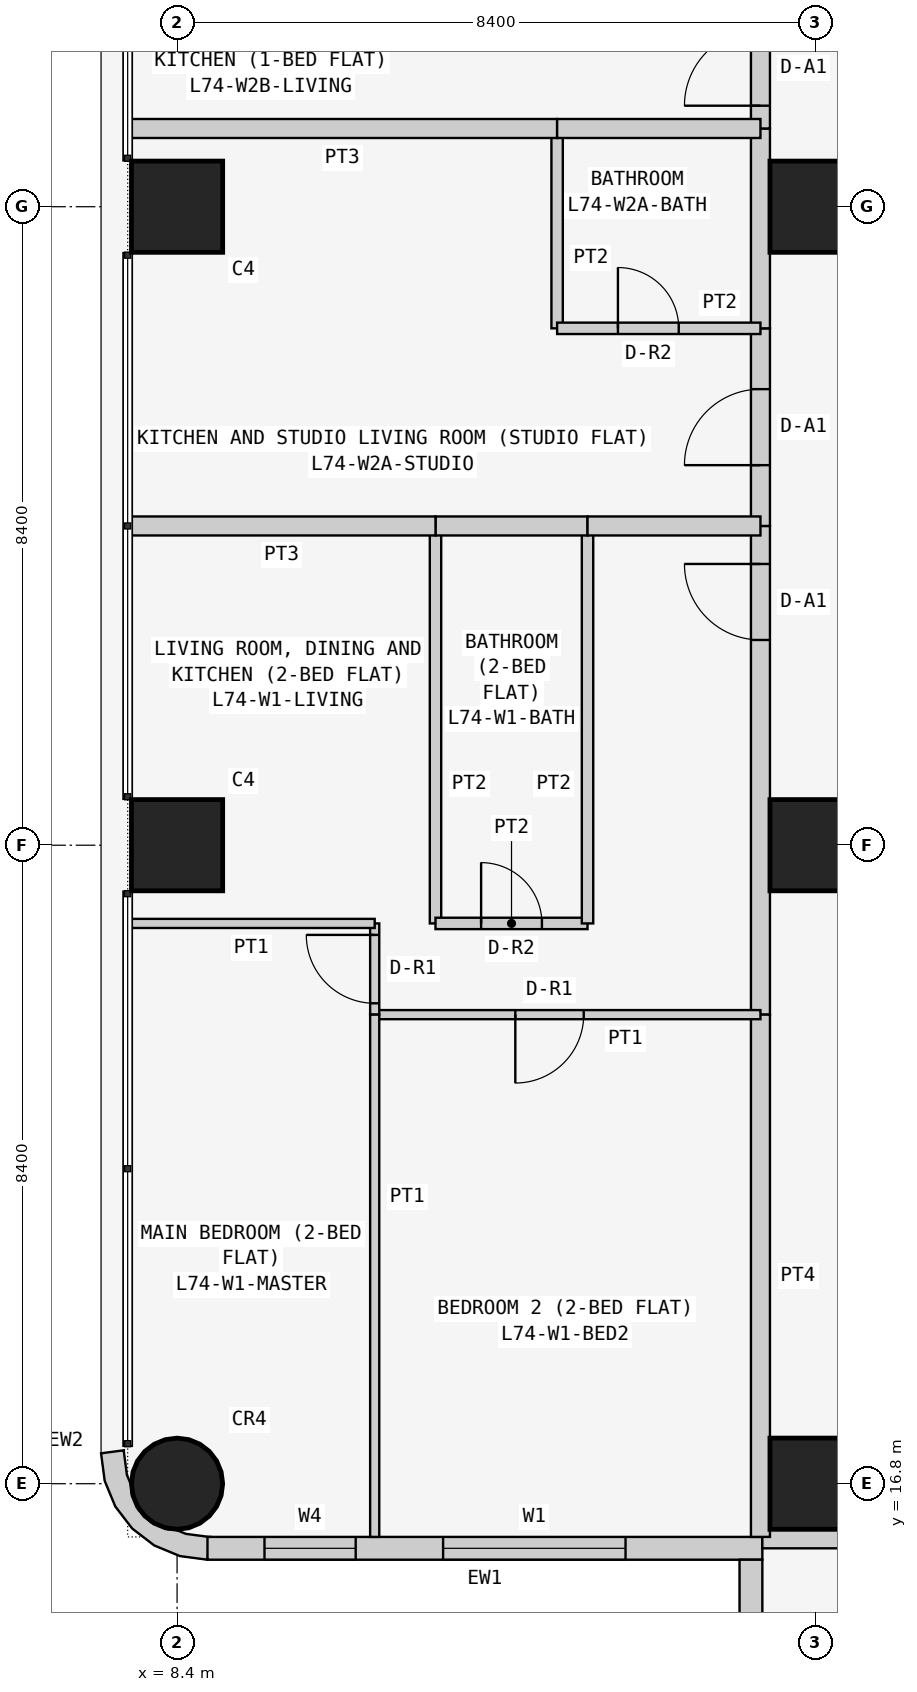
"""IFC4 building model, lengths in metres.
Left out: names, types, materials, properties, quantities, classifications, styles, units other than length and angle.
Written with IfcOpenShell. Run it as: python <this file> out.ifc"""

import sys

from ifc_helpers import new_model, si_unit, direction, frame, frame_2d, origin, origin_2d, place, context, subcontext, project, spatial, polyline, rectangle, circle, outline, extrude, element, fill, save


model = new_model("IFC4")
c1 = context("Model", 3, precision=1e-05, world=origin(), true_north=direction((0.0, 1.0)))
c2 = subcontext(c1, "Body", "Model", "MODEL_VIEW")
j1 = project(units=[si_unit("LENGTHUNIT", "METRE"), si_unit("PLANEANGLEUNIT", "RADIAN")], contexts=[c1])
p1 = place(None, origin())
s1 = spatial("IfcSite", under=j1, at=p1, CompositionType="ELEMENT")
p2 = place(p1, origin())
s2 = spatial("IfcBuilding", under=s1, at=p2, CompositionType="ELEMENT")
p3 = place(p2, frame((0.0, 0.0, 282.9)))
s3 = spatial("IfcBuildingStorey", under=s2, at=p3, CompositionType="ELEMENT", Elevation=282.9)
p4 = place(p3, frame((8.4, 16.8, 0.0), z_axis=(0.0, 0.0, 1.0), x_axis=(1.0, 0.0, 0.0)))
e1 = element("IfcColumn", 1, at=p4, inside=s3, PredefinedType="COLUMN", context=c2, shape_type="SweptSolid", body=[
    extrude(circle(Radius=0.6, at=origin_2d()), origin(), (0.0, 0.0, 1.0), 3.6),
])
for number, where, z_axis, x_axis in (
    (2, (8.4, 25.2, 0.0), (0.0, 0.0, 1.0), (1.0, 0.0, 0.0)),
    (3, (8.4, 33.6, 0.0), (0.0, 0.0, 1.0), (1.0, 0.0, 0.0)),
    (4, (16.8, 16.8, 0.0), (0.0, 0.0, 1.0), (1.0, 0.0, 0.0)),
    (5, (16.8, 25.2, 0.0), (0.0, 0.0, 1.0), (1.0, 0.0, 0.0)),
    (6, (16.8, 33.6, 0.0), (0.0, 0.0, 1.0), (1.0, 0.0, 0.0)),
):
    element("IfcColumn", number, at=place(p3, frame(where, z_axis=z_axis, x_axis=x_axis)), inside=s3, PredefinedType="COLUMN", context=c2, shape_type="SweptSolid", body=[
        extrude(rectangle(XDim=1.2, YDim=1.2, at=origin_2d()), origin(), (0.0, 0.0, 1.0), 3.6),
    ])
p5 = place(p3, frame((8.8, 15.95, 0.0), z_axis=(0.0, 0.0, 1.0), x_axis=(1.0, 0.0, 0.0)))
e7 = element("IfcWall", 7, at=p5, inside=s3, PredefinedType="SOLIDWALL", context=c2, shape_type="SweptSolid", body=[
    extrude(rectangle(XDim=7.3, YDim=0.3, at=frame_2d((3.65, 0.0))), origin(), (0.0, 0.0, 1.0), 3.45),
])
p6 = place(p5, frame((3.1, 0.0, 0.9)))
e8 = element("IfcOpeningElement", 8, at=p6, cuts=e7, PredefinedType="OPENING", context=c2, shape_type="SweptSolid", body=[
    extrude(rectangle(XDim=2.4, YDim=1.5, at=frame_2d((1.2, 0.75))), frame((0.0, 0.16, 0.0), z_axis=(0.0, -1.0, 0.0), x_axis=(1.0, 0.0, 0.0)), (0.0, 0.0, 1.0), 0.32),
])
p7 = place(p5, frame((0.75, 0.0, 0.9)))
e9 = element("IfcOpeningElement", 9, at=p7, cuts=e7, PredefinedType="OPENING", context=c2, shape_type="SweptSolid", body=[
    extrude(rectangle(XDim=1.2, YDim=1.5, at=frame_2d((0.6, 0.75))), frame((0.0, 0.16, 0.0), z_axis=(0.0, -1.0, 0.0), x_axis=(1.0, 0.0, 0.0)), (0.0, 0.0, 1.0), 0.32),
])
p8 = place(p3, frame((15.95, 15.8, 0.0), z_axis=(0.0, 0.0, 1.0), x_axis=(0.0, -1.0, 0.0)))
e10 = element("IfcWall", 10, at=p8, inside=s3, PredefinedType="SOLIDWALL", context=c2, shape_type="SweptSolid", body=[
    extrude(rectangle(XDim=7.0, YDim=0.3, at=frame_2d((3.5, 0.0))), origin(), (0.0, 0.0, 1.0), 3.45),
])
p9 = place(p8, frame((1.5, 0.0, 0.9)))
e11 = element("IfcOpeningElement", 11, at=p9, cuts=e10, PredefinedType="OPENING", context=c2, shape_type="SweptSolid", body=[
    extrude(rectangle(XDim=2.4, YDim=1.5, at=frame_2d((1.2, 0.75))), frame((0.0, 0.16, 0.0), z_axis=(0.0, -1.0, 0.0), x_axis=(1.0, 0.0, 0.0)), (0.0, 0.0, 1.0), 0.32),
])
p10 = place(p8, frame((5.05, 0.0, 0.9)))
e12 = element("IfcOpeningElement", 12, at=p10, cuts=e10, PredefinedType="OPENING", context=c2, shape_type="SweptSolid", body=[
    extrude(rectangle(XDim=1.2, YDim=1.5, at=frame_2d((0.6, 0.75))), frame((0.0, 0.16, 0.0), z_axis=(0.0, -1.0, 0.0), x_axis=(1.0, 0.0, 0.0)), (0.0, 0.0, 1.0), 0.32),
])
p11 = place(p3, frame((7.824, 17.162, 0.0), z_axis=(0.0, 0.0, 1.0), x_axis=(-0.707106781187, -0.707106781187, 0.0)))
e13 = element("IfcWall", 13, at=p11, inside=s3, PredefinedType="SOLIDWALL", context=c2, shape_type="SweptSolid", body=[
    extrude(outline(polyline([(0.047, 1.454), (0.233, 1.212), (0.292, 1.069), (0.358, 1.003), (0.449, 0.782), (0.449, 0.543), (0.358, 0.323), (0.292, 0.257), (0.233, 0.114), (0.047, -0.129), (0.033, -0.143), (0.273, -0.327), (0.495, -0.037), (0.635, 0.301), (0.683, 0.663), (0.635, 1.025), (0.495, 1.363), (0.273, 1.653), (0.033, 1.469), (0.047, 1.454)])), origin(), (0.0, 0.0, 1.0), 3.45),
])
p12 = place(p3, frame((22.571, 16.075, 0.0), z_axis=(0.0, 0.0, 1.0), x_axis=(-1.0, 0.0, 0.0)))
e14 = element("IfcWall", 14, at=p12, inside=s3, PredefinedType="PARTITIONING", context=c2, shape_type="SweptSolid", body=[
    extrude(rectangle(XDim=6.471, YDim=0.25, at=frame_2d((3.235, 0.0))), origin(), (0.0, 0.0, 1.0), 3.45),
])
p13 = place(p3, frame((16.075, 22.971, 0.0), z_axis=(0.0, 0.0, 1.0), x_axis=(0.0, 1.0, 0.0)))
e15 = element("IfcWall", 15, at=p13, inside=s3, PredefinedType="PARTITIONING", context=c2, shape_type="SweptSolid", body=[
    extrude(rectangle(XDim=6.429, YDim=0.25, at=frame_2d((3.214, 0.0))), origin(), (0.0, 0.0, 1.0), 3.45),
])
p14 = place(p13, frame((4.929, 0.0, 0.0)))
e16 = element("IfcOpeningElement", 16, at=p14, cuts=e15, PredefinedType="OPENING", context=c2, shape_type="SweptSolid", body=[
    extrude(rectangle(XDim=1.0, YDim=2.1, at=frame_2d((0.5, 1.05))), frame((0.0, 0.135, 0.0), z_axis=(0.0, -1.0, 0.0), x_axis=(1.0, 0.0, 0.0)), (0.0, 0.0, 1.0), 0.27),
])
p15 = place(p3, frame((16.075, 16.1, 0.0), z_axis=(0.0, 0.0, 1.0), x_axis=(0.0, 1.0, 0.0)))
e17 = element("IfcWall", 17, at=p15, inside=s3, PredefinedType="PARTITIONING", context=c2, shape_type="SweptSolid", body=[
    extrude(rectangle(XDim=6.871, YDim=0.25, at=frame_2d((3.436, 0.0))), origin(), (0.0, 0.0, 1.0), 3.45),
])
p16 = place(p3, frame((16.075, 29.4, 0.0), z_axis=(0.0, 0.0, 1.0), x_axis=(0.0, 1.0, 0.0)))
e18 = element("IfcWall", 18, at=p16, inside=s3, PredefinedType="PARTITIONING", context=c2, shape_type="SweptSolid", body=[
    extrude(rectangle(XDim=2.6, YDim=0.25, at=frame_2d((1.3, 0.0))), origin(), (0.0, 0.0, 1.0), 3.45),
])
p17 = place(p16, frame((0.8, 0.0, 0.0)))
e19 = element("IfcOpeningElement", 19, at=p17, cuts=e18, PredefinedType="OPENING", context=c2, shape_type="SweptSolid", body=[
    extrude(rectangle(XDim=1.0, YDim=2.1, at=frame_2d((0.5, 1.05))), frame((0.0, 0.135, 0.0), z_axis=(0.0, -1.0, 0.0), x_axis=(1.0, 0.0, 0.0)), (0.0, 0.0, 1.0), 0.27),
])
p18 = place(p3, frame((16.075, 32.0, 0.0), z_axis=(0.0, 0.0, 1.0), x_axis=(0.0, 1.0, 0.0)))
e20 = element("IfcWall", 20, at=p18, inside=s3, PredefinedType="PARTITIONING", context=c2, shape_type="SweptSolid", body=[
    extrude(rectangle(XDim=2.629, YDim=0.25, at=frame_2d((1.314, 0.0))), origin(), (0.0, 0.0, 1.0), 3.45),
])
p19 = place(p3, frame((16.075, 34.629, 0.0), z_axis=(0.0, 0.0, 1.0), x_axis=(0.0, 1.0, 0.0)))
e21 = element("IfcWall", 21, at=p19, inside=s3, PredefinedType="PARTITIONING", context=c2, shape_type="SweptSolid", body=[
    extrude(rectangle(XDim=1.6, YDim=0.25, at=frame_2d((0.8, 0.0))), origin(), (0.0, 0.0, 1.0), 3.45),
])
p20 = place(p19, frame((0.3, 0.0, 0.0)))
e22 = element("IfcOpeningElement", 22, at=p20, cuts=e21, PredefinedType="OPENING", context=c2, shape_type="SweptSolid", body=[
    extrude(rectangle(XDim=1.0, YDim=2.1, at=frame_2d((0.5, 1.05))), frame((0.0, 0.135, 0.0), z_axis=(0.0, -1.0, 0.0), x_axis=(1.0, 0.0, 0.0)), (0.0, 0.0, 1.0), 0.27),
])
p21 = place(p3, frame((11.8, 29.4, 0.0), z_axis=(0.0, 0.0, 1.0), x_axis=(0.0, -1.0, 0.0)))
e23 = element("IfcWall", 23, at=p21, inside=s3, PredefinedType="PARTITIONING", context=c2, shape_type="SweptSolid", body=[
    extrude(rectangle(XDim=5.229, YDim=0.15, at=frame_2d((2.615, 0.0))), origin(), (0.0, 0.0, 1.0), 3.45),
])
p22 = place(p3, frame((11.8, 24.171, 0.0), z_axis=(0.0, 0.0, 1.0), x_axis=(1.0, 0.0, 0.0)))
e24 = element("IfcWall", 24, at=p22, inside=s3, PredefinedType="PARTITIONING", context=c2, shape_type="SweptSolid", body=[
    extrude(rectangle(XDim=2.0, YDim=0.15, at=frame_2d((1.0, 0.0))), origin(), (0.0, 0.0, 1.0), 3.45),
])
p23 = place(p22, frame((0.6, 0.0, 0.0)))
e25 = element("IfcOpeningElement", 25, at=p23, cuts=e24, PredefinedType="OPENING", context=c2, shape_type="SweptSolid", body=[
    extrude(rectangle(XDim=0.8, YDim=2.1, at=frame_2d((0.4, 1.05))), frame((0.0, 0.085, 0.0), z_axis=(0.0, -1.0, 0.0), x_axis=(1.0, 0.0, 0.0)), (0.0, 0.0, 1.0), 0.17),
])
p24 = place(p3, frame((13.8, 24.171, 0.0), z_axis=(0.0, 0.0, 1.0), x_axis=(0.0, 1.0, 0.0)))
e26 = element("IfcWall", 26, at=p24, inside=s3, PredefinedType="PARTITIONING", context=c2, shape_type="SweptSolid", body=[
    extrude(rectangle(XDim=5.229, YDim=0.15, at=frame_2d((2.615, 0.0))), origin(), (0.0, 0.0, 1.0), 3.45),
])
p25 = place(p3, frame((13.8, 29.4, 0.0), z_axis=(0.0, 0.0, 1.0), x_axis=(-1.0, 0.0, 0.0)))
e27 = element("IfcWall", 27, at=p25, inside=s3, PredefinedType="PARTITIONING", context=c2, shape_type="SweptSolid", body=[
    extrude(rectangle(XDim=2.0, YDim=0.25, at=frame_2d((1.0, 0.0))), origin(), (0.0, 0.0, 1.0), 3.45),
])
p26 = place(p3, frame((16.075, 22.971, 0.0), z_axis=(0.0, 0.0, 1.0), x_axis=(-1.0, 0.0, 0.0)))
e28 = element("IfcWall", 28, at=p26, inside=s3, PredefinedType="PARTITIONING", context=c2, shape_type="SweptSolid", body=[
    extrude(rectangle(XDim=5.075, YDim=0.12, at=frame_2d((2.538, 0.0))), origin(), (0.0, 0.0, 1.0), 3.45),
])
p27 = place(p26, frame((2.325, 0.0, 0.0)))
e29 = element("IfcOpeningElement", 29, at=p27, cuts=e28, PredefinedType="OPENING", context=c2, shape_type="SweptSolid", body=[
    extrude(rectangle(XDim=0.9, YDim=2.1, at=frame_2d((0.45, 1.05))), frame((0.0, 0.07, 0.0), z_axis=(0.0, -1.0, 0.0), x_axis=(1.0, 0.0, 0.0)), (0.0, 0.0, 1.0), 0.14),
])
p28 = place(p3, frame((11.0, 22.971, 0.0), z_axis=(0.0, 0.0, 1.0), x_axis=(0.0, 1.0, 0.0)))
e30 = element("IfcWall", 30, at=p28, inside=s3, PredefinedType="PARTITIONING", context=c2, shape_type="SweptSolid", body=[
    extrude(rectangle(XDim=1.2, YDim=0.12, at=frame_2d((0.6, 0.0))), origin(), (0.0, 0.0, 1.0), 3.45),
])
p29 = place(p28, frame((0.149, 0.0, 0.0)))
e31 = element("IfcOpeningElement", 31, at=p29, cuts=e30, PredefinedType="OPENING", context=c2, shape_type="SweptSolid", body=[
    extrude(rectangle(XDim=0.9, YDim=2.1, at=frame_2d((0.45, 1.05))), frame((0.0, 0.07, 0.0), z_axis=(0.0, -1.0, 0.0), x_axis=(1.0, 0.0, 0.0)), (0.0, 0.0, 1.0), 0.14),
])
p30 = place(p3, frame((11.0, 24.171, 0.0), z_axis=(0.0, 0.0, 1.0), x_axis=(-1.0, 0.0, 0.0)))
e32 = element("IfcWall", 32, at=p30, inside=s3, PredefinedType="PARTITIONING", context=c2, shape_type="SweptSolid", body=[
    extrude(rectangle(XDim=3.25, YDim=0.12, at=frame_2d((1.625, 0.0))), origin(), (0.0, 0.0, 1.0), 3.45),
])
p31 = place(p3, frame((7.75, 29.4, 0.0), z_axis=(0.0, 0.0, 1.0), x_axis=(1.0, 0.0, 0.0)))
e33 = element("IfcWall", 33, at=p31, inside=s3, PredefinedType="PARTITIONING", context=c2, shape_type="SweptSolid", body=[
    extrude(rectangle(XDim=4.05, YDim=0.25, at=frame_2d((2.025, 0.0))), origin(), (0.0, 0.0, 1.0), 3.45),
])
p32 = place(p3, frame((13.8, 29.4, 0.0), z_axis=(0.0, 0.0, 1.0), x_axis=(1.0, 0.0, 0.0)))
e34 = element("IfcWall", 34, at=p32, inside=s3, PredefinedType="PARTITIONING", context=c2, shape_type="SweptSolid", body=[
    extrude(rectangle(XDim=2.275, YDim=0.25, at=frame_2d((1.137, 0.0))), origin(), (0.0, 0.0, 1.0), 3.45),
])
p33 = place(p3, frame((11.0, 22.971, 0.0), z_axis=(0.0, 0.0, 1.0), x_axis=(0.0, -1.0, 0.0)))
e35 = element("IfcWall", 35, at=p33, inside=s3, PredefinedType="PARTITIONING", context=c2, shape_type="SweptSolid", body=[
    extrude(rectangle(XDim=6.871, YDim=0.12, at=frame_2d((3.436, 0.0))), origin(), (0.0, 0.0, 1.0), 3.45),
])
p34 = place(p3, frame((13.4, 34.629, 0.0), z_axis=(0.0, 0.0, 1.0), x_axis=(0.0, -1.0, 0.0)))
e36 = element("IfcWall", 36, at=p34, inside=s3, PredefinedType="PARTITIONING", context=c2, shape_type="SweptSolid", body=[
    extrude(rectangle(XDim=2.629, YDim=0.15, at=frame_2d((1.314, 0.0))), origin(), (0.0, 0.0, 1.0), 3.45),
])
p35 = place(p3, frame((13.4, 32.0, 0.0), z_axis=(0.0, 0.0, 1.0), x_axis=(1.0, 0.0, 0.0)))
e37 = element("IfcWall", 37, at=p35, inside=s3, PredefinedType="PARTITIONING", context=c2, shape_type="SweptSolid", body=[
    extrude(rectangle(XDim=2.675, YDim=0.15, at=frame_2d((1.337, 0.0))), origin(), (0.0, 0.0, 1.0), 3.45),
])
p36 = place(p35, frame((0.8, 0.0, 0.0)))
e38 = element("IfcOpeningElement", 38, at=p36, cuts=e37, PredefinedType="OPENING", context=c2, shape_type="SweptSolid", body=[
    extrude(rectangle(XDim=0.8, YDim=2.1, at=frame_2d((0.4, 1.05))), frame((0.0, 0.085, 0.0), z_axis=(0.0, -1.0, 0.0), x_axis=(1.0, 0.0, 0.0)), (0.0, 0.0, 1.0), 0.17),
])
p37 = place(p3, frame((7.75, 34.629, 0.0), z_axis=(0.0, 0.0, 1.0), x_axis=(1.0, 0.0, 0.0)))
e39 = element("IfcWall", 39, at=p37, inside=s3, PredefinedType="PARTITIONING", context=c2, shape_type="SweptSolid", body=[
    extrude(rectangle(XDim=5.65, YDim=0.25, at=frame_2d((2.825, 0.0))), origin(), (0.0, 0.0, 1.0), 3.45),
])
p38 = place(p3, frame((13.4, 34.629, 0.0), z_axis=(0.0, 0.0, 1.0), x_axis=(1.0, 0.0, 0.0)))
e40 = element("IfcWall", 40, at=p38, inside=s3, PredefinedType="PARTITIONING", context=c2, shape_type="SweptSolid", body=[
    extrude(rectangle(XDim=2.675, YDim=0.25, at=frame_2d((1.337, 0.0))), origin(), (0.0, 0.0, 1.0), 3.45),
])
p39 = place(p6, origin())
e41 = element("IfcWindow", 41, at=p39, inside=s3, PartitioningType="SINGLE_PANEL", PredefinedType="WINDOW", context=c2, shape_type="SweptSolid", body=[
    extrude(rectangle(XDim=2.4, YDim=1.5, at=frame_2d((1.2, 0.75))), frame((0.0, 0.03, 0.0), z_axis=(0.0, -1.0, 0.0), x_axis=(1.0, 0.0, 0.0)), (0.0, 0.0, 1.0), 0.06),
])
fill(e8, e41)
p40 = place(p7, origin())
e42 = element("IfcWindow", 42, at=p40, inside=s3, PartitioningType="SINGLE_PANEL", PredefinedType="WINDOW", context=c2, shape_type="SweptSolid", body=[
    extrude(rectangle(XDim=1.2, YDim=1.5, at=frame_2d((0.6, 0.75))), frame((0.0, 0.03, 0.0), z_axis=(0.0, -1.0, 0.0), x_axis=(1.0, 0.0, 0.0)), (0.0, 0.0, 1.0), 0.06),
])
fill(e9, e42)
p41 = place(p14, origin())
e43 = element("IfcDoor", 43, at=p41, inside=s3, OperationType="SINGLE_SWING_RIGHT", PredefinedType="DOOR", context=c2, shape_type="SweptSolid", body=[
    extrude(rectangle(XDim=1.0, YDim=2.1, at=frame_2d((0.5, 1.05))), frame((0.0, 0.025, 0.0), z_axis=(0.0, -1.0, 0.0), x_axis=(1.0, 0.0, 0.0)), (0.0, 0.0, 1.0), 0.05),
])
fill(e16, e43)
p42 = place(p23, origin())
e44 = element("IfcDoor", 44, at=p42, inside=s3, OperationType="SINGLE_SWING_LEFT", PredefinedType="DOOR", context=c2, shape_type="SweptSolid", body=[
    extrude(rectangle(XDim=0.8, YDim=2.1, at=frame_2d((0.4, 1.05))), frame((0.0, 0.025, 0.0), z_axis=(0.0, -1.0, 0.0), x_axis=(1.0, 0.0, 0.0)), (0.0, 0.0, 1.0), 0.05),
])
fill(e25, e44)
p43 = place(p27, origin())
e45 = element("IfcDoor", 45, at=p43, inside=s3, OperationType="SINGLE_SWING_RIGHT", PredefinedType="DOOR", context=c2, shape_type="SweptSolid", body=[
    extrude(rectangle(XDim=0.9, YDim=2.1, at=frame_2d((0.45, 1.05))), frame((0.0, 0.025, 0.0), z_axis=(0.0, -1.0, 0.0), x_axis=(1.0, 0.0, 0.0)), (0.0, 0.0, 1.0), 0.05),
])
fill(e29, e45)
p44 = place(p29, origin())
e46 = element("IfcDoor", 46, at=p44, inside=s3, OperationType="SINGLE_SWING_RIGHT", PredefinedType="DOOR", context=c2, shape_type="SweptSolid", body=[
    extrude(rectangle(XDim=0.9, YDim=2.1, at=frame_2d((0.45, 1.05))), frame((0.0, 0.025, 0.0), z_axis=(0.0, -1.0, 0.0), x_axis=(1.0, 0.0, 0.0)), (0.0, 0.0, 1.0), 0.05),
])
fill(e31, e46)
p45 = place(p17, origin())
e47 = element("IfcDoor", 47, at=p45, inside=s3, OperationType="SINGLE_SWING_LEFT", PredefinedType="DOOR", context=c2, shape_type="SweptSolid", body=[
    extrude(rectangle(XDim=1.0, YDim=2.1, at=frame_2d((0.5, 1.05))), frame((0.0, 0.025, 0.0), z_axis=(0.0, -1.0, 0.0), x_axis=(1.0, 0.0, 0.0)), (0.0, 0.0, 1.0), 0.05),
])
fill(e19, e47)
p46 = place(p36, origin())
e48 = element("IfcDoor", 48, at=p46, inside=s3, OperationType="SINGLE_SWING_LEFT", PredefinedType="DOOR", context=c2, shape_type="SweptSolid", body=[
    extrude(rectangle(XDim=0.8, YDim=2.1, at=frame_2d((0.4, 1.05))), frame((0.0, 0.025, 0.0), z_axis=(0.0, -1.0, 0.0), x_axis=(1.0, 0.0, 0.0)), (0.0, 0.0, 1.0), 0.05),
])
fill(e38, e48)
p47 = place(p20, origin())
e49 = element("IfcDoor", 49, at=p47, inside=s3, OperationType="SINGLE_SWING_LEFT", PredefinedType="DOOR", context=c2, shape_type="SweptSolid", body=[
    extrude(rectangle(XDim=1.0, YDim=2.1, at=frame_2d((0.5, 1.05))), frame((0.0, 0.025, 0.0), z_axis=(0.0, -1.0, 0.0), x_axis=(1.0, 0.0, 0.0)), (0.0, 0.0, 1.0), 0.05),
])
fill(e22, e49)
save(model, sys.argv[1])
